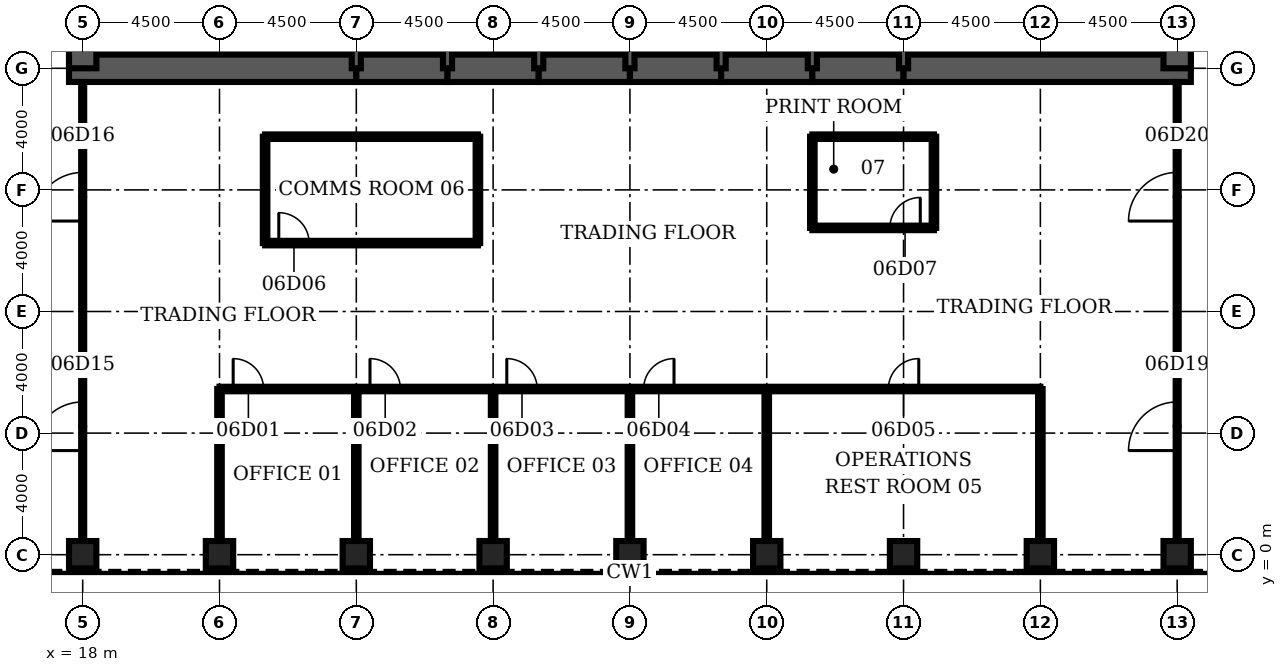
"""IFC4 building model, lengths in metres.
Left out: names, types, materials, properties, quantities, classifications, styles, units other than length and angle.
Written with IfcOpenShell. Run it as: python <this file> out.ifc"""

import sys

from ifc_helpers import new_model, si_unit, direction, frame, frame_2d, origin, origin_2d, place, context, subcontext, project, spatial, rectangle, hollow_rectangle, extrude, element, fill, save


model = new_model("IFC4")
c1 = context("Model", 3, precision=1e-05, world=origin(), true_north=direction((0.0, 1.0)))
c2 = subcontext(c1, "Body", "Model", "MODEL_VIEW")
j1 = project(units=[si_unit("LENGTHUNIT", "METRE"), si_unit("PLANEANGLEUNIT", "RADIAN")], contexts=[c1])
p1 = place(None, origin())
s1 = spatial("IfcSite", under=j1, at=p1, CompositionType="ELEMENT")
p2 = place(p1, origin())
s2 = spatial("IfcBuilding", under=s1, at=p2, CompositionType="ELEMENT")
p3 = place(p2, frame((0.0, 0.0, 32.0)))
s3 = spatial("IfcBuildingStorey", under=s2, at=p3, CompositionType="ELEMENT", Elevation=32.0)
for number, where, z_axis, x_axis in (
    (1, (18.0, 0.0, 0.0), (0.0, 0.0, 1.0), (0.0, 1.0, 0.0)),
    (2, (22.5, 0.0, 0.0), (0.0, 0.0, 1.0), (0.0, 1.0, 0.0)),
    (3, (27.0, 0.0, 0.0), (0.0, 0.0, 1.0), (0.0, 1.0, 0.0)),
    (4, (31.5, 0.0, 0.0), (0.0, 0.0, 1.0), (0.0, 1.0, 0.0)),
    (5, (36.0, 0.0, 0.0), (0.0, 0.0, 1.0), (0.0, 1.0, 0.0)),
    (6, (40.5, 0.0, 0.0), (0.0, 0.0, 1.0), (0.0, 1.0, 0.0)),
    (7, (45.0, 0.0, 0.0), (0.0, 0.0, 1.0), (0.0, 1.0, 0.0)),
    (8, (49.5, 0.0, 0.0), (0.0, 0.0, 1.0), (0.0, 1.0, 0.0)),
    (9, (54.0, 0.0, 0.0), (0.0, 0.0, 1.0), (0.0, 1.0, 0.0)),
):
    element("IfcColumn", number, at=place(p3, frame(where, z_axis=z_axis, x_axis=x_axis)), inside=s3, PredefinedType="COLUMN", context=c2, shape_type="SweptSolid", body=[
        extrude(hollow_rectangle(XDim=0.9, YDim=0.9, WallThickness=0.12, at=origin_2d()), origin(), (0.0, 0.0, 1.0), 4.5),
    ])
p4 = place(p3, frame((17.55, 16.0, 0.0), z_axis=(0.0, 0.0, 1.0), x_axis=(1.0, 0.0, 0.0)))
e10 = element("IfcWall", 10, at=p4, inside=s3, PredefinedType="SHEAR", context=c2, shape_type="SweptSolid", body=[
    extrude(rectangle(XDim=9.45, YDim=0.9, at=frame_2d((4.725, 0.0))), origin(), (0.0, 0.0, 1.0), 4.5),
])
for number, where, z_axis, x_axis in (
    (11, (27.0, 16.0, 0.0), (0.0, 0.0, 1.0), (1.0, 0.0, 0.0)),
    (12, (30.0, 16.0, 0.0), (0.0, 0.0, 1.0), (1.0, 0.0, 0.0)),
    (13, (33.0, 16.0, 0.0), (0.0, 0.0, 1.0), (1.0, 0.0, 0.0)),
    (14, (36.0, 16.0, 0.0), (0.0, 0.0, 1.0), (1.0, 0.0, 0.0)),
    (15, (39.0, 16.0, 0.0), (0.0, 0.0, 1.0), (1.0, 0.0, 0.0)),
    (16, (42.0, 16.0, 0.0), (0.0, 0.0, 1.0), (1.0, 0.0, 0.0)),
):
    element("IfcWall", number, at=place(p3, frame(where, z_axis=z_axis, x_axis=x_axis)), inside=s3, PredefinedType="SHEAR", context=c2, shape_type="SweptSolid", body=[
        extrude(rectangle(XDim=3.0, YDim=0.9, at=frame_2d((1.5, 0.0))), origin(), (0.0, 0.0, 1.0), 4.5),
    ])
p5 = place(p3, frame((45.0, 16.0, 0.0), z_axis=(0.0, 0.0, 1.0), x_axis=(1.0, 0.0, 0.0)))
e17 = element("IfcWall", 17, at=p5, inside=s3, PredefinedType="SHEAR", context=c2, shape_type="SweptSolid", body=[
    extrude(rectangle(XDim=9.45, YDim=0.9, at=frame_2d((4.725, 0.0))), origin(), (0.0, 0.0, 1.0), 4.5),
])
for number, where, z_axis, x_axis in (
    (18, (18.0, 19.2, 0.0), (0.0, 0.0, 1.0), (0.0, -1.0, 0.0)),
    (19, (54.0, 16.0, 0.0), (0.0, 0.0, 1.0), (0.0, 1.0, 0.0)),
):
    element("IfcWall", number, at=place(p3, frame(where, z_axis=z_axis, x_axis=x_axis)), inside=s3, PredefinedType="SHEAR", context=c2, shape_type="SweptSolid", body=[
        extrude(rectangle(XDim=3.2, YDim=0.9, at=frame_2d((1.6, 0.0))), origin(), (0.0, 0.0, 1.0), 4.5),
    ])
for number, where, z_axis, x_axis in (
    (20, (27.0, 16.0, 0.0), (0.0, 0.0, 1.0), (0.0, 1.0, 0.0)),
    (21, (30.0, 16.0, 0.0), (0.0, 0.0, 1.0), (0.0, 1.0, 0.0)),
    (22, (33.0, 16.0, 0.0), (0.0, 0.0, 1.0), (0.0, 1.0, 0.0)),
    (23, (36.0, 16.0, 0.0), (0.0, 0.0, 1.0), (0.0, 1.0, 0.0)),
    (24, (39.0, 16.0, 0.0), (0.0, 0.0, 1.0), (0.0, 1.0, 0.0)),
    (25, (42.0, 16.0, 0.0), (0.0, 0.0, 1.0), (0.0, 1.0, 0.0)),
    (26, (45.0, 16.0, 0.0), (0.0, 0.0, 1.0), (0.0, 1.0, 0.0)),
):
    element("IfcWall", number, at=place(p3, frame(where, z_axis=z_axis, x_axis=x_axis)), inside=s3, PredefinedType="SOLIDWALL", context=c2, shape_type="SweptSolid", body=[
        extrude(rectangle(XDim=3.2, YDim=0.3, at=frame_2d((1.6, 0.0))), origin(), (0.0, 0.0, 1.0), 4.5),
    ])
p6 = place(p3, frame((22.5, 5.45, 0.0), z_axis=(0.0, 0.0, 1.0), x_axis=(1.0, 0.0, 0.0)))
e27 = element("IfcWall", 27, at=p6, inside=s3, PredefinedType="PARTITIONING", context=c2, shape_type="SweptSolid", body=[
    extrude(rectangle(XDim=27.0, YDim=0.15, at=frame_2d((13.5, 0.0))), origin(), (0.0, 0.0, 1.0), 3.0),
])
p7 = place(p6, frame((0.45, 0.0, 0.0)))
e28 = element("IfcOpeningElement", 28, at=p7, cuts=e27, PredefinedType="OPENING", context=c2, shape_type="SweptSolid", body=[
    extrude(rectangle(XDim=1.0, YDim=2.1, at=frame_2d((0.5, 1.05))), frame((0.0, 0.085, 0.0), z_axis=(0.0, -1.0, 0.0), x_axis=(1.0, 0.0, 0.0)), (0.0, 0.0, 1.0), 0.17),
])
p8 = place(p6, frame((4.95, 0.0, 0.0)))
e29 = element("IfcOpeningElement", 29, at=p8, cuts=e27, PredefinedType="OPENING", context=c2, shape_type="SweptSolid", body=[
    extrude(rectangle(XDim=1.0, YDim=2.1, at=frame_2d((0.5, 1.05))), frame((0.0, 0.085, 0.0), z_axis=(0.0, -1.0, 0.0), x_axis=(1.0, 0.0, 0.0)), (0.0, 0.0, 1.0), 0.17),
])
p9 = place(p6, frame((9.45, 0.0, 0.0)))
e30 = element("IfcOpeningElement", 30, at=p9, cuts=e27, PredefinedType="OPENING", context=c2, shape_type="SweptSolid", body=[
    extrude(rectangle(XDim=1.0, YDim=2.1, at=frame_2d((0.5, 1.05))), frame((0.0, 0.085, 0.0), z_axis=(0.0, -1.0, 0.0), x_axis=(1.0, 0.0, 0.0)), (0.0, 0.0, 1.0), 0.17),
])
p10 = place(p6, frame((13.95, 0.0, 0.0)))
e31 = element("IfcOpeningElement", 31, at=p10, cuts=e27, PredefinedType="OPENING", context=c2, shape_type="SweptSolid", body=[
    extrude(rectangle(XDim=1.0, YDim=2.1, at=frame_2d((0.5, 1.05))), frame((0.0, 0.085, 0.0), z_axis=(0.0, -1.0, 0.0), x_axis=(1.0, 0.0, 0.0)), (0.0, 0.0, 1.0), 0.17),
])
p11 = place(p6, frame((22.0, 0.0, 0.0)))
e32 = element("IfcOpeningElement", 32, at=p11, cuts=e27, PredefinedType="OPENING", context=c2, shape_type="SweptSolid", body=[
    extrude(rectangle(XDim=1.0, YDim=2.1, at=frame_2d((0.5, 1.05))), frame((0.0, 0.085, 0.0), z_axis=(0.0, -1.0, 0.0), x_axis=(1.0, 0.0, 0.0)), (0.0, 0.0, 1.0), 0.17),
])
p12 = place(p3, frame((24.0, 10.25, 0.0), z_axis=(0.0, 0.0, 1.0), x_axis=(1.0, 0.0, 0.0)))
e33 = element("IfcWall", 33, at=p12, inside=s3, PredefinedType="PARTITIONING", context=c2, shape_type="SweptSolid", body=[
    extrude(rectangle(XDim=7.0, YDim=0.15, at=frame_2d((3.5, 0.0))), origin(), (0.0, 0.0, 1.0), 3.0),
])
p13 = place(p12, frame((0.45, 0.0, 0.0)))
e34 = element("IfcOpeningElement", 34, at=p13, cuts=e33, PredefinedType="OPENING", context=c2, shape_type="SweptSolid", body=[
    extrude(rectangle(XDim=1.0, YDim=2.1, at=frame_2d((0.5, 1.05))), frame((0.0, 0.085, 0.0), z_axis=(0.0, -1.0, 0.0), x_axis=(1.0, 0.0, 0.0)), (0.0, 0.0, 1.0), 0.17),
])
p14 = place(p3, frame((42.0, 10.75, 0.0), z_axis=(0.0, 0.0, 1.0), x_axis=(1.0, 0.0, 0.0)))
e35 = element("IfcWall", 35, at=p14, inside=s3, PredefinedType="PARTITIONING", context=c2, shape_type="SweptSolid", body=[
    extrude(rectangle(XDim=4.0, YDim=0.15, at=frame_2d((2.0, 0.0))), origin(), (0.0, 0.0, 1.0), 3.0),
])
p15 = place(p14, frame((2.55, 0.0, 0.0)))
e36 = element("IfcOpeningElement", 36, at=p15, cuts=e35, PredefinedType="OPENING", context=c2, shape_type="SweptSolid", body=[
    extrude(rectangle(XDim=1.0, YDim=2.1, at=frame_2d((0.5, 1.05))), frame((0.0, 0.085, 0.0), z_axis=(0.0, -1.0, 0.0), x_axis=(1.0, 0.0, 0.0)), (0.0, 0.0, 1.0), 0.17),
])
p16 = place(p3, frame((24.0, 13.75, 0.0), z_axis=(0.0, 0.0, 1.0), x_axis=(1.0, 0.0, 0.0)))
e37 = element("IfcWall", 37, at=p16, inside=s3, PredefinedType="PARTITIONING", context=c2, shape_type="SweptSolid", body=[
    extrude(rectangle(XDim=7.0, YDim=0.15, at=frame_2d((3.5, 0.0))), origin(), (0.0, 0.0, 1.0), 3.0),
])
p17 = place(p3, frame((42.0, 13.75, 0.0), z_axis=(0.0, 0.0, 1.0), x_axis=(1.0, 0.0, 0.0)))
e38 = element("IfcWall", 38, at=p17, inside=s3, PredefinedType="PARTITIONING", context=c2, shape_type="SweptSolid", body=[
    extrude(rectangle(XDim=4.0, YDim=0.15, at=frame_2d((2.0, 0.0))), origin(), (0.0, 0.0, 1.0), 3.0),
])
p18 = place(p3, frame((18.0, 0.45, 0.0), z_axis=(0.0, 0.0, 1.0), x_axis=(0.0, 1.0, 0.0)))
e39 = element("IfcWall", 39, at=p18, inside=s3, PredefinedType="PARTITIONING", context=c2, shape_type="SweptSolid", body=[
    extrude(rectangle(XDim=15.1, YDim=0.1, at=frame_2d((7.55, 0.0))), origin(), (0.0, 0.0, 1.0), 3.0),
])
p19 = place(p18, frame((2.975, 0.0, 0.0)))
e40 = element("IfcOpeningElement", 40, at=p19, cuts=e39, PredefinedType="OPENING", context=c2, shape_type="SweptSolid", body=[
    extrude(rectangle(XDim=1.6, YDim=2.1, at=frame_2d((0.8, 1.05))), frame((0.0, 0.06, 0.0), z_axis=(0.0, -1.0, 0.0), x_axis=(1.0, 0.0, 0.0)), (0.0, 0.0, 1.0), 0.12),
])
p20 = place(p18, frame((10.525, 0.0, 0.0)))
e41 = element("IfcOpeningElement", 41, at=p20, cuts=e39, PredefinedType="OPENING", context=c2, shape_type="SweptSolid", body=[
    extrude(rectangle(XDim=1.6, YDim=2.1, at=frame_2d((0.8, 1.05))), frame((0.0, 0.06, 0.0), z_axis=(0.0, -1.0, 0.0), x_axis=(1.0, 0.0, 0.0)), (0.0, 0.0, 1.0), 0.12),
])
p21 = place(p3, frame((22.5, 0.45, 0.0), z_axis=(0.0, 0.0, 1.0), x_axis=(0.0, 1.0, 0.0)))
e42 = element("IfcWall", 42, at=p21, inside=s3, PredefinedType="PARTITIONING", context=c2, shape_type="SweptSolid", body=[
    extrude(rectangle(XDim=5.0, YDim=0.15, at=frame_2d((2.5, 0.0))), origin(), (0.0, 0.0, 1.0), 3.0),
])
p22 = place(p3, frame((24.0, 10.25, 0.0), z_axis=(0.0, 0.0, 1.0), x_axis=(0.0, 1.0, 0.0)))
e43 = element("IfcWall", 43, at=p22, inside=s3, PredefinedType="PARTITIONING", context=c2, shape_type="SweptSolid", body=[
    extrude(rectangle(XDim=3.5, YDim=0.15, at=frame_2d((1.75, 0.0))), origin(), (0.0, 0.0, 1.0), 3.0),
])
p23 = place(p3, frame((27.0, 0.45, 0.0), z_axis=(0.0, 0.0, 1.0), x_axis=(0.0, 1.0, 0.0)))
e44 = element("IfcWall", 44, at=p23, inside=s3, PredefinedType="PARTITIONING", context=c2, shape_type="SweptSolid", body=[
    extrude(rectangle(XDim=5.0, YDim=0.15, at=frame_2d((2.5, 0.0))), origin(), (0.0, 0.0, 1.0), 3.0),
])
p24 = place(p3, frame((31.0, 10.25, 0.0), z_axis=(0.0, 0.0, 1.0), x_axis=(0.0, 1.0, 0.0)))
e45 = element("IfcWall", 45, at=p24, inside=s3, PredefinedType="PARTITIONING", context=c2, shape_type="SweptSolid", body=[
    extrude(rectangle(XDim=3.5, YDim=0.15, at=frame_2d((1.75, 0.0))), origin(), (0.0, 0.0, 1.0), 3.0),
])
for number, where, z_axis, x_axis in (
    (46, (31.5, 0.45, 0.0), (0.0, 0.0, 1.0), (0.0, 1.0, 0.0)),
    (47, (36.0, 0.45, 0.0), (0.0, 0.0, 1.0), (0.0, 1.0, 0.0)),
    (48, (40.5, 0.45, 0.0), (0.0, 0.0, 1.0), (0.0, 1.0, 0.0)),
):
    element("IfcWall", number, at=place(p3, frame(where, z_axis=z_axis, x_axis=x_axis)), inside=s3, PredefinedType="PARTITIONING", context=c2, shape_type="SweptSolid", body=[
        extrude(rectangle(XDim=5.0, YDim=0.15, at=frame_2d((2.5, 0.0))), origin(), (0.0, 0.0, 1.0), 3.0),
    ])
for number, where, z_axis, x_axis in (
    (49, (42.0, 10.75, 0.0), (0.0, 0.0, 1.0), (0.0, 1.0, 0.0)),
    (50, (46.0, 10.75, 0.0), (0.0, 0.0, 1.0), (0.0, 1.0, 0.0)),
):
    element("IfcWall", number, at=place(p3, frame(where, z_axis=z_axis, x_axis=x_axis)), inside=s3, PredefinedType="PARTITIONING", context=c2, shape_type="SweptSolid", body=[
        extrude(rectangle(XDim=3.0, YDim=0.15, at=frame_2d((1.5, 0.0))), origin(), (0.0, 0.0, 1.0), 3.0),
    ])
p25 = place(p3, frame((49.5, 0.45, 0.0), z_axis=(0.0, 0.0, 1.0), x_axis=(0.0, 1.0, 0.0)))
e51 = element("IfcWall", 51, at=p25, inside=s3, PredefinedType="PARTITIONING", context=c2, shape_type="SweptSolid", body=[
    extrude(rectangle(XDim=5.0, YDim=0.15, at=frame_2d((2.5, 0.0))), origin(), (0.0, 0.0, 1.0), 3.0),
])
p26 = place(p3, frame((54.0, 0.45, 0.0), z_axis=(0.0, 0.0, 1.0), x_axis=(0.0, 1.0, 0.0)))
e52 = element("IfcWall", 52, at=p26, inside=s3, PredefinedType="PARTITIONING", context=c2, shape_type="SweptSolid", body=[
    extrude(rectangle(XDim=15.1, YDim=0.1, at=frame_2d((7.55, 0.0))), origin(), (0.0, 0.0, 1.0), 3.0),
])
p27 = place(p26, frame((2.975, 0.0, 0.0)))
e53 = element("IfcOpeningElement", 53, at=p27, cuts=e52, PredefinedType="OPENING", context=c2, shape_type="SweptSolid", body=[
    extrude(rectangle(XDim=1.6, YDim=2.1, at=frame_2d((0.8, 1.05))), frame((0.0, 0.06, 0.0), z_axis=(0.0, -1.0, 0.0), x_axis=(1.0, 0.0, 0.0)), (0.0, 0.0, 1.0), 0.12),
])
p28 = place(p26, frame((10.525, 0.0, 0.0)))
e54 = element("IfcOpeningElement", 54, at=p28, cuts=e52, PredefinedType="OPENING", context=c2, shape_type="SweptSolid", body=[
    extrude(rectangle(XDim=1.6, YDim=2.1, at=frame_2d((0.8, 1.05))), frame((0.0, 0.06, 0.0), z_axis=(0.0, -1.0, 0.0), x_axis=(1.0, 0.0, 0.0)), (0.0, 0.0, 1.0), 0.12),
])
p29 = place(p7, origin())
e55 = element("IfcDoor", 55, at=p29, inside=s3, OperationType="SINGLE_SWING_LEFT", PredefinedType="DOOR", context=c2, shape_type="SweptSolid", body=[
    extrude(rectangle(XDim=1.0, YDim=2.1, at=frame_2d((0.5, 1.05))), frame((0.0, 0.025, 0.0), z_axis=(0.0, -1.0, 0.0), x_axis=(1.0, 0.0, 0.0)), (0.0, 0.0, 1.0), 0.05),
])
fill(e28, e55)
p30 = place(p8, origin())
e56 = element("IfcDoor", 56, at=p30, inside=s3, OperationType="SINGLE_SWING_LEFT", PredefinedType="DOOR", context=c2, shape_type="SweptSolid", body=[
    extrude(rectangle(XDim=1.0, YDim=2.1, at=frame_2d((0.5, 1.05))), frame((0.0, 0.025, 0.0), z_axis=(0.0, -1.0, 0.0), x_axis=(1.0, 0.0, 0.0)), (0.0, 0.0, 1.0), 0.05),
])
fill(e29, e56)
p31 = place(p9, origin())
e57 = element("IfcDoor", 57, at=p31, inside=s3, OperationType="SINGLE_SWING_LEFT", PredefinedType="DOOR", context=c2, shape_type="SweptSolid", body=[
    extrude(rectangle(XDim=1.0, YDim=2.1, at=frame_2d((0.5, 1.05))), frame((0.0, 0.025, 0.0), z_axis=(0.0, -1.0, 0.0), x_axis=(1.0, 0.0, 0.0)), (0.0, 0.0, 1.0), 0.05),
])
fill(e30, e57)
p32 = place(p10, origin())
e58 = element("IfcDoor", 58, at=p32, inside=s3, OperationType="SINGLE_SWING_RIGHT", PredefinedType="DOOR", context=c2, shape_type="SweptSolid", body=[
    extrude(rectangle(XDim=1.0, YDim=2.1, at=frame_2d((0.5, 1.05))), frame((0.0, 0.025, 0.0), z_axis=(0.0, -1.0, 0.0), x_axis=(1.0, 0.0, 0.0)), (0.0, 0.0, 1.0), 0.05),
])
fill(e31, e58)
p33 = place(p11, origin())
e59 = element("IfcDoor", 59, at=p33, inside=s3, OperationType="SINGLE_SWING_RIGHT", PredefinedType="DOOR", context=c2, shape_type="SweptSolid", body=[
    extrude(rectangle(XDim=1.0, YDim=2.1, at=frame_2d((0.5, 1.05))), frame((0.0, 0.025, 0.0), z_axis=(0.0, -1.0, 0.0), x_axis=(1.0, 0.0, 0.0)), (0.0, 0.0, 1.0), 0.05),
])
fill(e32, e59)
p34 = place(p13, origin())
e60 = element("IfcDoor", 60, at=p34, inside=s3, OperationType="SINGLE_SWING_LEFT", PredefinedType="DOOR", context=c2, shape_type="SweptSolid", body=[
    extrude(rectangle(XDim=1.0, YDim=2.1, at=frame_2d((0.5, 1.05))), frame((0.0, 0.025, 0.0), z_axis=(0.0, -1.0, 0.0), x_axis=(1.0, 0.0, 0.0)), (0.0, 0.0, 1.0), 0.05),
])
fill(e34, e60)
p35 = place(p15, origin())
e61 = element("IfcDoor", 61, at=p35, inside=s3, OperationType="SINGLE_SWING_RIGHT", PredefinedType="DOOR", context=c2, shape_type="SweptSolid", body=[
    extrude(rectangle(XDim=1.0, YDim=2.1, at=frame_2d((0.5, 1.05))), frame((0.0, 0.025, 0.0), z_axis=(0.0, -1.0, 0.0), x_axis=(1.0, 0.0, 0.0)), (0.0, 0.0, 1.0), 0.05),
])
fill(e36, e61)
p36 = place(p19, origin())
e62 = element("IfcDoor", 62, at=p36, inside=s3, OperationType="SINGLE_SWING_LEFT", PredefinedType="DOOR", context=c2, shape_type="SweptSolid", body=[
    extrude(rectangle(XDim=1.6, YDim=2.1, at=frame_2d((0.8, 1.05))), frame((0.0, 0.025, 0.0), z_axis=(0.0, -1.0, 0.0), x_axis=(1.0, 0.0, 0.0)), (0.0, 0.0, 1.0), 0.05),
])
fill(e40, e62)
p37 = place(p20, origin())
e63 = element("IfcDoor", 63, at=p37, inside=s3, OperationType="SINGLE_SWING_LEFT", PredefinedType="DOOR", context=c2, shape_type="SweptSolid", body=[
    extrude(rectangle(XDim=1.6, YDim=2.1, at=frame_2d((0.8, 1.05))), frame((0.0, 0.025, 0.0), z_axis=(0.0, -1.0, 0.0), x_axis=(1.0, 0.0, 0.0)), (0.0, 0.0, 1.0), 0.05),
])
fill(e41, e63)
p38 = place(p27, origin())
e64 = element("IfcDoor", 64, at=p38, inside=s3, OperationType="SINGLE_SWING_LEFT", PredefinedType="DOOR", context=c2, shape_type="SweptSolid", body=[
    extrude(rectangle(XDim=1.6, YDim=2.1, at=frame_2d((0.8, 1.05))), frame((0.0, 0.025, 0.0), z_axis=(0.0, -1.0, 0.0), x_axis=(1.0, 0.0, 0.0)), (0.0, 0.0, 1.0), 0.05),
])
fill(e53, e64)
p39 = place(p28, origin())
e65 = element("IfcDoor", 65, at=p39, inside=s3, OperationType="SINGLE_SWING_LEFT", PredefinedType="DOOR", context=c2, shape_type="SweptSolid", body=[
    extrude(rectangle(XDim=1.6, YDim=2.1, at=frame_2d((0.8, 1.05))), frame((0.0, 0.025, 0.0), z_axis=(0.0, -1.0, 0.0), x_axis=(1.0, 0.0, 0.0)), (0.0, 0.0, 1.0), 0.05),
])
fill(e54, e65)
save(model, sys.argv[1])
